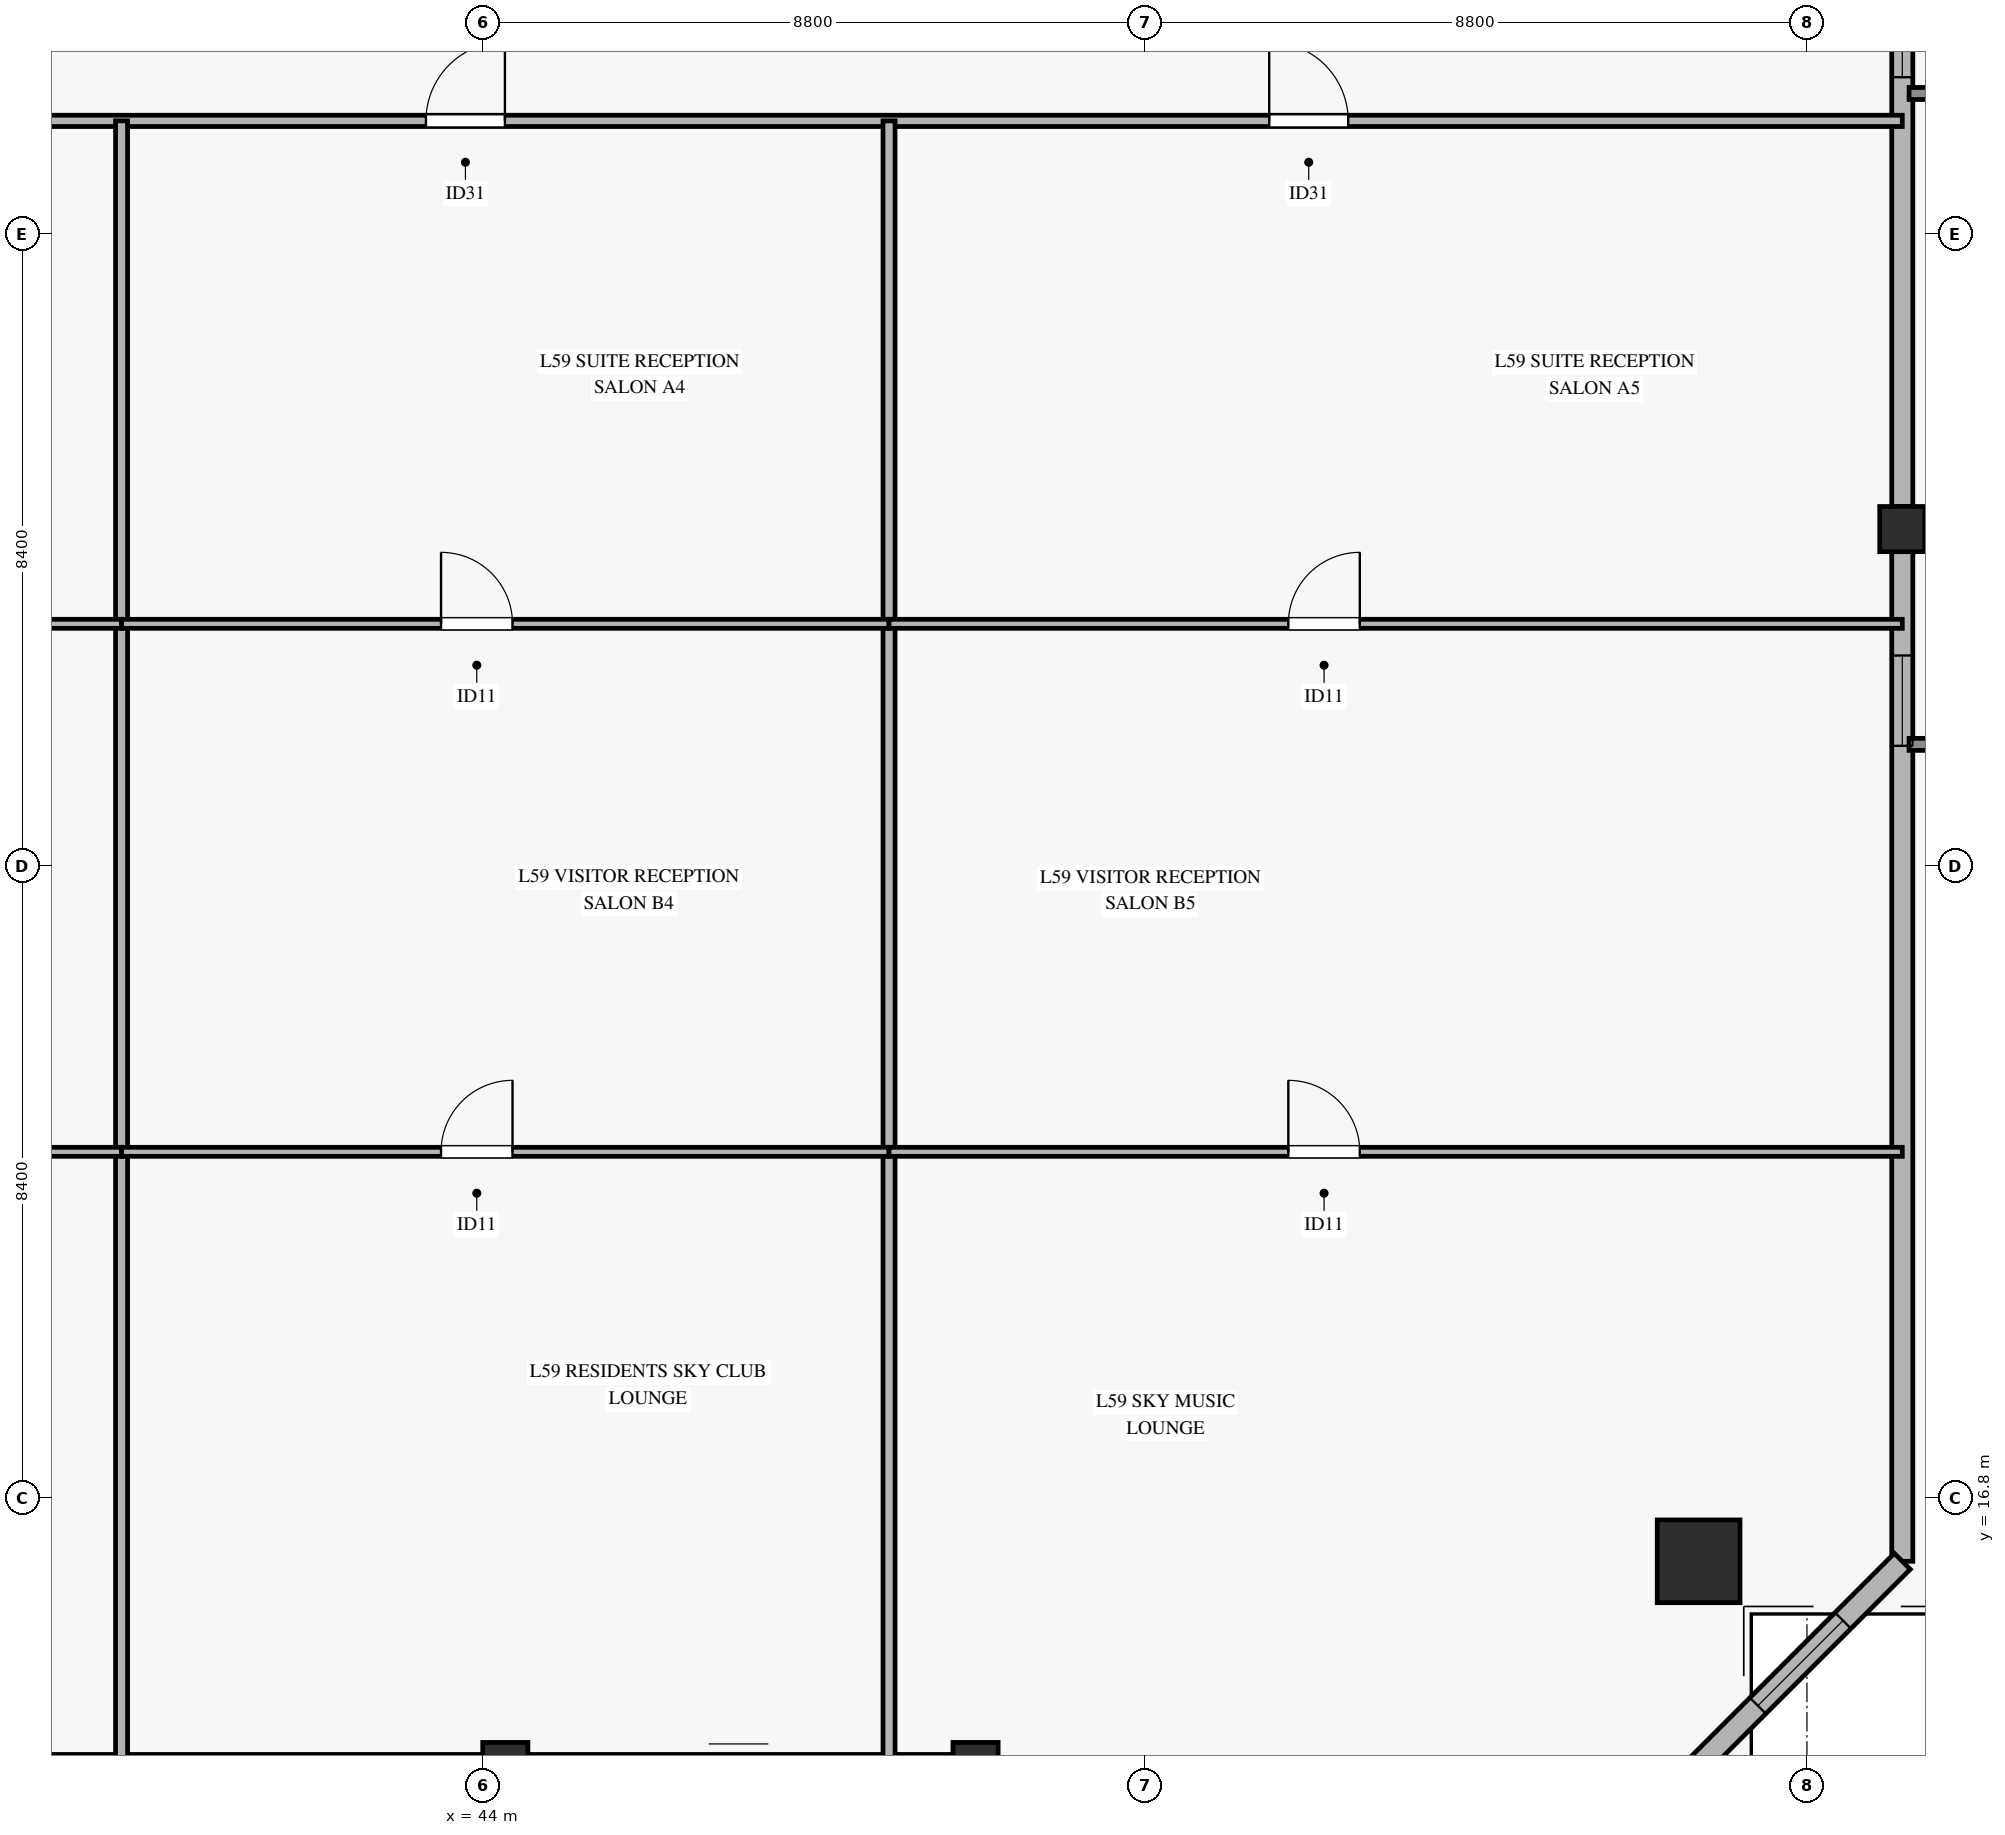
"""IFC4 building model, lengths in metres.
Left out: names, types, materials, properties, quantities, classifications, styles, units other than length and angle.
Written with IfcOpenShell. Run it as: python <this file> out.ifc"""

import sys

from ifc_helpers import new_model, si_unit, direction, frame, frame_2d, origin, origin_2d, place, context, subcontext, project, spatial, rectangle, hollow_rectangle, extrude, source, transform, mapped, element, fill, save


model = new_model("IFC4")
c1 = context("Model", 3, precision=1e-05, world=origin(), true_north=direction((0.0, 1.0)))
c2 = subcontext(c1, "Body", "Model", "MODEL_VIEW")
j1 = project(units=[si_unit("LENGTHUNIT", "METRE"), si_unit("PLANEANGLEUNIT", "RADIAN")], contexts=[c1])
p1 = place(None, origin())
s1 = spatial("IfcSite", under=j1, at=p1, CompositionType="ELEMENT")
p2 = place(p1, origin())
s2 = spatial("IfcBuilding", under=s1, at=p2, CompositionType="ELEMENT")
p3 = place(p2, frame((0.0, 0.0, 233.8)))
s3 = spatial("IfcBuildingStorey", under=s2, at=p3, CompositionType="ELEMENT", Elevation=233.8)
m1 = source(origin(), c2, "Body", "SweptSolid", [
    extrude(hollow_rectangle(XDim=1.1, YDim=1.1, WallThickness=0.05, at=origin_2d()), origin(), (0.0, 0.0, 1.0), 3.264),
])
p4 = place(p3, frame((60.16, 15.957, 0.0), z_axis=(-0.113014620919, 0.271429556131, 0.95580002695), x_axis=(-0.92317473482, -0.384380552305, 0.0)))
e1 = element("IfcColumn", 1, at=p4, inside=s3, PredefinedType="COLUMN", context=c2, shape_type="MappedRepresentation", body=[
    mapped(m1, transform((0.0, 0.0, 0.0), x_axis=(1.0, 0.0, 0.0), y_axis=(0.0, 1.0, 0.0), z_axis=(0.0, 0.0, 1.0), scale=1.0)),
])
m2 = source(origin(), c2, "Body", "SweptSolid", [
    extrude(hollow_rectangle(XDim=0.6, YDim=0.6, WallThickness=0.028, at=origin_2d()), origin(), (0.0, 0.0, 1.0), 3.256),
])
for number, where, z_axis, x_axis in (
    (2, (44.3, 13.25, 0.0), (0.0, 0.286, 0.958), (-1.0, 0.0, 0.0)),
    (3, (50.55, 13.25, 0.0), (0.0, 0.286, 0.958), (-1.0, 0.0, 0.0)),
):
    element("IfcColumn", number, at=place(p3, frame(where, z_axis=z_axis, x_axis=x_axis)), inside=s3, PredefinedType="COLUMN", context=c2, shape_type="MappedRepresentation", body=[
        mapped(m2, transform((0.0, 0.0, 0.0), x_axis=(1.0, 0.0, 0.0), y_axis=(0.0, 1.0, 0.0), z_axis=(0.0, 0.0, 1.0), scale=1.0)),
    ])
m3 = source(origin(), c2, "Body", "SweptSolid", [
    extrude(hollow_rectangle(XDim=0.6, YDim=0.6, WallThickness=0.028, at=origin_2d()), origin(), (0.0, 0.0, 1.0), 3.182),
])
p5 = place(p3, frame((62.867, 29.675, 0.0), z_axis=(-0.130446553885, 0.146483806686, 0.980574418878), x_axis=(-0.746804669772, -0.665043446104, 0.0)))
e4 = element("IfcColumn", 4, at=p5, inside=s3, PredefinedType="COLUMN", context=c2, shape_type="MappedRepresentation", body=[
    mapped(m3, transform((0.0, 0.0, 0.0), x_axis=(1.0, 0.0, 0.0), y_axis=(0.0, 1.0, 0.0), z_axis=(0.0, 0.0, 1.0), scale=1.0)),
])
p6 = place(p3, frame((37.85, 13.25, 0.0), z_axis=(0.0, 0.0, 1.0), x_axis=(1.0, 0.0, 0.0)))
e5 = element("IfcWall", 5, at=p6, inside=s3, PredefinedType="SOLIDWALL", context=c2, shape_type="SweptSolid", body=[
    extrude(rectangle(XDim=6.15, YDim=0.28, at=frame_2d((3.075, 0.0))), origin(), (0.0, 0.0, 1.0), 2.75),
])
p7 = place(p3, frame((44.6, 13.25, 0.0), z_axis=(0.0, 0.0, 1.0), x_axis=(1.0, 0.0, 0.0)))
e6 = element("IfcWall", 6, at=p7, inside=s3, PredefinedType="SOLIDWALL", context=c2, shape_type="SweptSolid", body=[
    extrude(rectangle(XDim=5.65, YDim=0.28, at=frame_2d((2.825, 0.0))), origin(), (0.0, 0.0, 1.0), 2.75),
])
p8 = place(p7, frame((1.9, 0.0, 0.0)))
e7 = element("IfcOpeningElement", 7, at=p8, cuts=e6, PredefinedType="OPENING", context=c2, shape_type="SweptSolid", body=[
    extrude(rectangle(XDim=1.8, YDim=2.25, at=frame_2d((0.9, 1.125))), frame((0.0, 0.15, 0.0), z_axis=(0.0, -1.0, 0.0), x_axis=(1.0, 0.0, 0.0)), (0.0, 0.0, 1.0), 0.3),
])
p9 = place(p3, frame((62.867, 15.957, 0.0), z_axis=(0.0, 0.0, 1.0), x_axis=(0.0, 1.0, 0.0)))
e8 = element("IfcWall", 8, at=p9, inside=s3, PredefinedType="SOLIDWALL", context=c2, shape_type="SweptSolid", body=[
    extrude(rectangle(XDim=13.418, YDim=0.28, at=frame_2d((6.709, 0.0))), origin(), (0.0, 0.0, 1.0), 2.75),
])
p10 = place(p9, frame((10.838, 0.0, 0.45)))
e9 = element("IfcOpeningElement", 9, at=p10, cuts=e8, PredefinedType="OPENING", context=c2, shape_type="SweptSolid", body=[
    extrude(rectangle(XDim=1.2, YDim=2.0, at=frame_2d((0.6, 1.0))), frame((0.0, 0.15, 0.0), z_axis=(0.0, -1.0, 0.0), x_axis=(1.0, 0.0, 0.0)), (0.0, 0.0, 1.0), 0.3),
])
p11 = place(p3, frame((62.867, 29.975, 0.0), z_axis=(0.0, 0.0, 1.0), x_axis=(0.0, 1.0, 0.0)))
e10 = element("IfcWall", 10, at=p11, inside=s3, PredefinedType="SOLIDWALL", context=c2, shape_type="SweptSolid", body=[
    extrude(rectangle(XDim=13.418, YDim=0.28, at=frame_2d((6.709, 0.0))), origin(), (0.0, 0.0, 1.0), 2.75),
])
p12 = place(p11, frame((5.705, 0.0, 0.45)))
e11 = element("IfcOpeningElement", 11, at=p12, cuts=e10, PredefinedType="OPENING", context=c2, shape_type="SweptSolid", body=[
    extrude(rectangle(XDim=1.2, YDim=2.0, at=frame_2d((0.6, 1.0))), frame((0.0, 0.15, 0.0), z_axis=(0.0, -1.0, 0.0), x_axis=(1.0, 0.0, 0.0)), (0.0, 0.0, 1.0), 0.3),
])
p13 = place(p3, frame((60.16, 13.25, 0.0), z_axis=(0.0, 0.0, 1.0), x_axis=(0.707106781187, 0.707106781187, 0.0)))
e12 = element("IfcWall", 12, at=p13, inside=s3, PredefinedType="SOLIDWALL", context=c2, shape_type="SweptSolid", body=[
    extrude(rectangle(XDim=3.828, YDim=0.3, at=frame_2d((1.914, 0.0))), origin(), (0.0, 0.0, 1.0), 2.75),
])
p14 = place(p13, frame((1.114, 0.0, 0.45)))
e13 = element("IfcOpeningElement", 13, at=p14, cuts=e12, PredefinedType="OPENING", context=c2, shape_type="SweptSolid", body=[
    extrude(rectangle(XDim=1.6, YDim=2.0, at=frame_2d((0.8, 1.0))), frame((0.0, 0.16, 0.0), z_axis=(0.0, -1.0, 0.0), x_axis=(1.0, 0.0, 0.0)), (0.0, 0.0, 1.0), 0.32),
])
p15 = place(p3, frame((7.533, 35.1, 0.0), z_axis=(0.0, 0.0, 1.0), x_axis=(1.0, 0.0, 0.0)))
e14 = element("IfcWall", 14, at=p15, inside=s3, PredefinedType="PARTITIONING", context=c2, shape_type="SweptSolid", body=[
    extrude(rectangle(XDim=55.334, YDim=0.15, at=frame_2d((27.667, 0.0))), origin(), (0.0, 0.0, 1.0), 2.305),
])
p16 = place(p15, frame((5.592, 0.0, 0.0)))
e15 = element("IfcOpeningElement", 15, at=p16, cuts=e14, PredefinedType="OPENING", context=c2, shape_type="SweptSolid", body=[
    extrude(rectangle(XDim=1.05, YDim=2.15, at=frame_2d((0.525, 1.075))), frame((0.0, 0.085, 0.0), z_axis=(0.0, -1.0, 0.0), x_axis=(1.0, 0.0, 0.0)), (0.0, 0.0, 1.0), 0.17),
])
p17 = place(p15, frame((17.207, 0.0, 0.0)))
e16 = element("IfcOpeningElement", 16, at=p17, cuts=e14, PredefinedType="OPENING", context=c2, shape_type="SweptSolid", body=[
    extrude(rectangle(XDim=1.05, YDim=2.15, at=frame_2d((0.525, 1.075))), frame((0.0, 0.085, 0.0), z_axis=(0.0, -1.0, 0.0), x_axis=(1.0, 0.0, 0.0)), (0.0, 0.0, 1.0), 0.17),
])
p18 = place(p15, frame((25.884, 0.0, 0.0)))
e17 = element("IfcOpeningElement", 17, at=p18, cuts=e14, PredefinedType="OPENING", context=c2, shape_type="SweptSolid", body=[
    extrude(rectangle(XDim=1.05, YDim=2.15, at=frame_2d((0.525, 1.075))), frame((0.0, 0.085, 0.0), z_axis=(0.0, -1.0, 0.0), x_axis=(1.0, 0.0, 0.0)), (0.0, 0.0, 1.0), 0.17),
])
p19 = place(p15, frame((35.712, 0.0, 0.0)))
e18 = element("IfcOpeningElement", 18, at=p19, cuts=e14, PredefinedType="OPENING", context=c2, shape_type="SweptSolid", body=[
    extrude(rectangle(XDim=1.05, YDim=2.15, at=frame_2d((0.525, 1.075))), frame((0.0, 0.085, 0.0), z_axis=(0.0, -1.0, 0.0), x_axis=(1.0, 0.0, 0.0)), (0.0, 0.0, 1.0), 0.17),
])
p20 = place(p15, frame((46.92, 0.0, 0.0)))
e19 = element("IfcOpeningElement", 19, at=p20, cuts=e14, PredefinedType="OPENING", context=c2, shape_type="SweptSolid", body=[
    extrude(rectangle(XDim=1.05, YDim=2.15, at=frame_2d((0.525, 1.075))), frame((0.0, 0.085, 0.0), z_axis=(0.0, -1.0, 0.0), x_axis=(1.0, 0.0, 0.0)), (0.0, 0.0, 1.0), 0.17),
])
for number, where, z_axis, x_axis in (
    (20, (39.2, 13.25, 0.0), (0.0, 0.0, 1.0), (0.0, 1.0, 0.0)),
    (21, (49.4, 13.25, 0.0), (0.0, 0.0, 1.0), (0.0, 1.0, 0.0)),
):
    element("IfcWall", number, at=place(p3, frame(where, z_axis=z_axis, x_axis=x_axis)), inside=s3, PredefinedType="PARTITIONING", context=c2, shape_type="SweptSolid", body=[
        extrude(rectangle(XDim=21.85, YDim=0.16, at=frame_2d((10.925, 0.0))), origin(), (0.0, 0.0, 1.0), 2.705),
    ])
p21 = place(p3, frame((29.6, 21.399, 0.0), z_axis=(0.0, 0.0, 1.0), x_axis=(1.0, 0.0, 0.0)))
e22 = element("IfcWall", 22, at=p21, inside=s3, PredefinedType="PARTITIONING", context=c2, shape_type="SweptSolid", body=[
    extrude(rectangle(XDim=9.6, YDim=0.12, at=frame_2d((4.8, 0.0))), origin(), (0.0, 0.0, 1.0), 2.305),
])
p22 = place(p21, frame((4.006, 0.0, 0.0)))
e23 = element("IfcOpeningElement", 23, at=p22, cuts=e22, PredefinedType="OPENING", context=c2, shape_type="SweptSolid", body=[
    extrude(rectangle(XDim=0.95, YDim=2.1, at=frame_2d((0.475, 1.05))), frame((0.0, 0.07, 0.0), z_axis=(0.0, -1.0, 0.0), x_axis=(1.0, 0.0, 0.0)), (0.0, 0.0, 1.0), 0.14),
])
p23 = place(p3, frame((29.6, 28.416, 0.0), z_axis=(0.0, 0.0, 1.0), x_axis=(1.0, 0.0, 0.0)))
e24 = element("IfcWall", 24, at=p23, inside=s3, PredefinedType="PARTITIONING", context=c2, shape_type="SweptSolid", body=[
    extrude(rectangle(XDim=9.6, YDim=0.12, at=frame_2d((4.8, 0.0))), origin(), (0.0, 0.0, 1.0), 2.305),
])
p24 = place(p23, frame((4.006, 0.0, 0.0)))
e25 = element("IfcOpeningElement", 25, at=p24, cuts=e24, PredefinedType="OPENING", context=c2, shape_type="SweptSolid", body=[
    extrude(rectangle(XDim=0.95, YDim=2.1, at=frame_2d((0.475, 1.05))), frame((0.0, 0.07, 0.0), z_axis=(0.0, -1.0, 0.0), x_axis=(1.0, 0.0, 0.0)), (0.0, 0.0, 1.0), 0.14),
])
p25 = place(p3, frame((39.2, 21.399, 0.0), z_axis=(0.0, 0.0, 1.0), x_axis=(1.0, 0.0, 0.0)))
e26 = element("IfcWall", 26, at=p25, inside=s3, PredefinedType="PARTITIONING", context=c2, shape_type="SweptSolid", body=[
    extrude(rectangle(XDim=10.2, YDim=0.12, at=frame_2d((5.1, 0.0))), origin(), (0.0, 0.0, 1.0), 2.305),
])
p26 = place(p25, frame((4.246, 0.0, 0.0)))
e27 = element("IfcOpeningElement", 27, at=p26, cuts=e26, PredefinedType="OPENING", context=c2, shape_type="SweptSolid", body=[
    extrude(rectangle(XDim=0.95, YDim=2.1, at=frame_2d((0.475, 1.05))), frame((0.0, 0.07, 0.0), z_axis=(0.0, -1.0, 0.0), x_axis=(1.0, 0.0, 0.0)), (0.0, 0.0, 1.0), 0.14),
])
p27 = place(p3, frame((39.2, 28.416, 0.0), z_axis=(0.0, 0.0, 1.0), x_axis=(1.0, 0.0, 0.0)))
e28 = element("IfcWall", 28, at=p27, inside=s3, PredefinedType="PARTITIONING", context=c2, shape_type="SweptSolid", body=[
    extrude(rectangle(XDim=10.2, YDim=0.12, at=frame_2d((5.1, 0.0))), origin(), (0.0, 0.0, 1.0), 2.305),
])
p28 = place(p27, frame((4.246, 0.0, 0.0)))
e29 = element("IfcOpeningElement", 29, at=p28, cuts=e28, PredefinedType="OPENING", context=c2, shape_type="SweptSolid", body=[
    extrude(rectangle(XDim=0.95, YDim=2.1, at=frame_2d((0.475, 1.05))), frame((0.0, 0.07, 0.0), z_axis=(0.0, -1.0, 0.0), x_axis=(1.0, 0.0, 0.0)), (0.0, 0.0, 1.0), 0.14),
])
p29 = place(p3, frame((49.4, 21.399, 0.0), z_axis=(0.0, 0.0, 1.0), x_axis=(1.0, 0.0, 0.0)))
e30 = element("IfcWall", 30, at=p29, inside=s3, PredefinedType="PARTITIONING", context=c2, shape_type="SweptSolid", body=[
    extrude(rectangle(XDim=13.467, YDim=0.12, at=frame_2d((6.733, 0.0))), origin(), (0.0, 0.0, 1.0), 2.305),
])
p30 = place(p29, frame((5.307, 0.0, 0.0)))
e31 = element("IfcOpeningElement", 31, at=p30, cuts=e30, PredefinedType="OPENING", context=c2, shape_type="SweptSolid", body=[
    extrude(rectangle(XDim=0.95, YDim=2.1, at=frame_2d((0.475, 1.05))), frame((0.0, 0.07, 0.0), z_axis=(0.0, -1.0, 0.0), x_axis=(1.0, 0.0, 0.0)), (0.0, 0.0, 1.0), 0.14),
])
p31 = place(p3, frame((49.4, 28.416, 0.0), z_axis=(0.0, 0.0, 1.0), x_axis=(1.0, 0.0, 0.0)))
e32 = element("IfcWall", 32, at=p31, inside=s3, PredefinedType="PARTITIONING", context=c2, shape_type="SweptSolid", body=[
    extrude(rectangle(XDim=13.467, YDim=0.12, at=frame_2d((6.733, 0.0))), origin(), (0.0, 0.0, 1.0), 2.305),
])
p32 = place(p31, frame((5.307, 0.0, 0.0)))
e33 = element("IfcOpeningElement", 33, at=p32, cuts=e32, PredefinedType="OPENING", context=c2, shape_type="SweptSolid", body=[
    extrude(rectangle(XDim=0.95, YDim=2.1, at=frame_2d((0.475, 1.05))), frame((0.0, 0.07, 0.0), z_axis=(0.0, -1.0, 0.0), x_axis=(1.0, 0.0, 0.0)), (0.0, 0.0, 1.0), 0.14),
])
m4 = source(origin(), c2, "Body", "SweptSolid", [
    extrude(rectangle(XDim=1.2, YDim=2.0, at=frame_2d((0.6, 1.0))), frame((0.0, 0.03, 0.0), z_axis=(0.0, -1.0, 0.0), x_axis=(1.0, 0.0, 0.0)), (0.0, 0.0, 1.0), 0.06),
])
p33 = place(p10, origin())
e34 = element("IfcWindow", 34, at=p33, inside=s3, PartitioningType="SINGLE_PANEL", PredefinedType="WINDOW", context=c2, shape_type="MappedRepresentation", body=[
    mapped(m4, transform((0.0, 0.0, 0.0), x_axis=(1.0, 0.0, 0.0), y_axis=(0.0, 1.0, 0.0), z_axis=(0.0, 0.0, 1.0), scale=1.0)),
])
fill(e9, e34)
p34 = place(p12, origin())
e35 = element("IfcWindow", 35, at=p34, inside=s3, PartitioningType="SINGLE_PANEL", PredefinedType="WINDOW", context=c2, shape_type="MappedRepresentation", body=[
    mapped(m4, transform((0.0, 0.0, 0.0), x_axis=(1.0, 0.0, 0.0), y_axis=(0.0, 1.0, 0.0), z_axis=(0.0, 0.0, 1.0), scale=1.0)),
])
fill(e11, e35)
m5 = source(origin(), c2, "Body", "SweptSolid", [
    extrude(rectangle(XDim=1.6, YDim=2.0, at=frame_2d((0.8, 1.0))), frame((0.0, 0.03, 0.0), z_axis=(0.0, -1.0, 0.0), x_axis=(1.0, 0.0, 0.0)), (0.0, 0.0, 1.0), 0.06),
])
p35 = place(p14, origin())
e36 = element("IfcWindow", 36, at=p35, inside=s3, PartitioningType="SINGLE_PANEL", PredefinedType="WINDOW", context=c2, shape_type="MappedRepresentation", body=[
    mapped(m5, transform((0.0, 0.0, 0.0), x_axis=(1.0, 0.0, 0.0), y_axis=(0.0, 1.0, 0.0), z_axis=(0.0, 0.0, 1.0), scale=1.0)),
])
fill(e13, e36)
m6 = source(origin(), c2, "Body", "SweptSolid", [
    extrude(rectangle(XDim=1.05, YDim=2.15, at=frame_2d((0.525, 1.075))), frame((0.0, 0.025, 0.0), z_axis=(0.0, -1.0, 0.0), x_axis=(1.0, 0.0, 0.0)), (0.0, 0.0, 1.0), 0.05),
])
p36 = place(p19, origin())
e37 = element("IfcDoor", 37, at=p36, inside=s3, OperationType="SINGLE_SWING_RIGHT", PredefinedType="DOOR", context=c2, shape_type="MappedRepresentation", body=[
    mapped(m6, transform((0.0, 0.0, 0.0), x_axis=(1.0, 0.0, 0.0), y_axis=(0.0, 1.0, 0.0), z_axis=(0.0, 0.0, 1.0), scale=1.0)),
])
fill(e18, e37)
m7 = source(origin(), c2, "Body", "SweptSolid", [
    extrude(rectangle(XDim=0.95, YDim=2.1, at=frame_2d((0.475, 1.05))), frame((0.0, 0.025, 0.0), z_axis=(0.0, -1.0, 0.0), x_axis=(1.0, 0.0, 0.0)), (0.0, 0.0, 1.0), 0.05),
])
p37 = place(p28, origin())
e38 = element("IfcDoor", 38, at=p37, inside=s3, OperationType="SINGLE_SWING_LEFT", PredefinedType="DOOR", context=c2, shape_type="MappedRepresentation", body=[
    mapped(m7, transform((0.0, 0.0, 0.0), x_axis=(1.0, 0.0, 0.0), y_axis=(0.0, 1.0, 0.0), z_axis=(0.0, 0.0, 1.0), scale=1.0)),
])
fill(e29, e38)
p38 = place(p26, origin())
e39 = element("IfcDoor", 39, at=p38, inside=s3, OperationType="SINGLE_SWING_RIGHT", PredefinedType="DOOR", context=c2, shape_type="MappedRepresentation", body=[
    mapped(m7, transform((0.0, 0.0, 0.0), x_axis=(1.0, 0.0, 0.0), y_axis=(0.0, 1.0, 0.0), z_axis=(0.0, 0.0, 1.0), scale=1.0)),
])
fill(e27, e39)
p39 = place(p20, origin())
e40 = element("IfcDoor", 40, at=p39, inside=s3, OperationType="SINGLE_SWING_LEFT", PredefinedType="DOOR", context=c2, shape_type="MappedRepresentation", body=[
    mapped(m6, transform((0.0, 0.0, 0.0), x_axis=(1.0, 0.0, 0.0), y_axis=(0.0, 1.0, 0.0), z_axis=(0.0, 0.0, 1.0), scale=1.0)),
])
fill(e19, e40)
p40 = place(p32, origin())
e41 = element("IfcDoor", 41, at=p40, inside=s3, OperationType="SINGLE_SWING_RIGHT", PredefinedType="DOOR", context=c2, shape_type="MappedRepresentation", body=[
    mapped(m7, transform((0.0, 0.0, 0.0), x_axis=(1.0, 0.0, 0.0), y_axis=(0.0, 1.0, 0.0), z_axis=(0.0, 0.0, 1.0), scale=1.0)),
])
fill(e33, e41)
p41 = place(p30, origin())
e42 = element("IfcDoor", 42, at=p41, inside=s3, OperationType="SINGLE_SWING_LEFT", PredefinedType="DOOR", context=c2, shape_type="MappedRepresentation", body=[
    mapped(m7, transform((0.0, 0.0, 0.0), x_axis=(1.0, 0.0, 0.0), y_axis=(0.0, 1.0, 0.0), z_axis=(0.0, 0.0, 1.0), scale=1.0)),
])
fill(e31, e42)
save(model, sys.argv[1])
